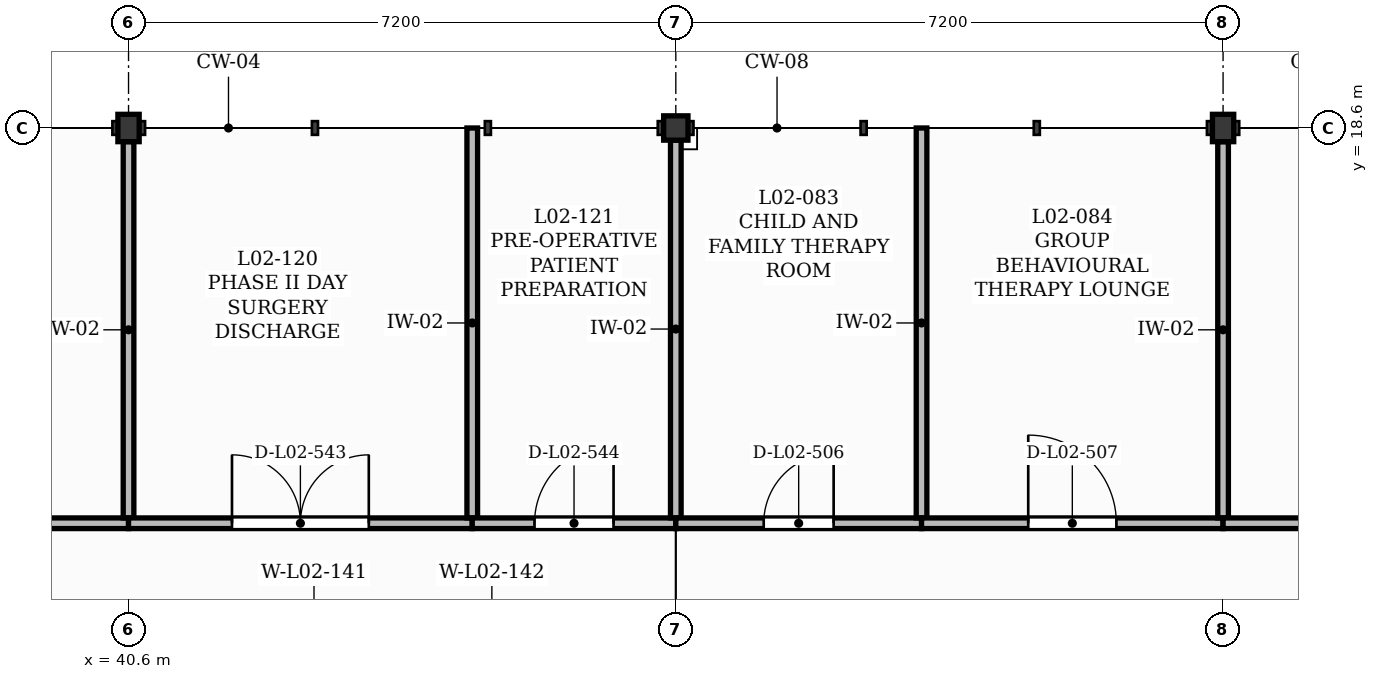
"""IFC4 building model, lengths in metres.
Left out: names, types, materials, properties, quantities, classifications, styles, units other than length and angle.
Written with IfcOpenShell. Run it as: python <this file> out.ifc"""

import sys

from ifc_helpers import new_model, si_unit, direction, frame, frame_2d, origin, origin_2d, place, context, subcontext, project, spatial, rectangle, extrude, element, fill, save


model = new_model("IFC4")
c1 = context("Model", 3, precision=1e-05, world=origin(), true_north=direction((0.0, 1.0)))
c2 = subcontext(c1, "Body", "Model", "MODEL_VIEW")
j1 = project(units=[si_unit("LENGTHUNIT", "METRE"), si_unit("PLANEANGLEUNIT", "RADIAN")], contexts=[c1])
p1 = place(None, origin())
s1 = spatial("IfcSite", under=j1, at=p1, CompositionType="ELEMENT")
p2 = place(p1, origin())
s2 = spatial("IfcBuilding", under=s1, at=p2, CompositionType="ELEMENT")
p3 = place(p2, frame((0.0, 0.0, 9.0)))
s3 = spatial("IfcBuildingStorey", under=s2, at=p3, CompositionType="ELEMENT", Elevation=9.0)
p4 = place(p3, frame((40.6, 18.6, 0.0), z_axis=(0.0, 0.0, 1.0), x_axis=(1.0, 0.0, 0.0)))
e1 = element("IfcColumn", 1, at=p4, inside=s3, PredefinedType="COLUMN", context=c2, shape_type="SweptSolid", body=[
    extrude(rectangle(XDim=0.28, YDim=0.36, at=origin_2d()), origin(), (0.0, 0.0, 1.0), 3.95),
])
p5 = place(p3, frame((47.8, 18.6, 0.0), z_axis=(0.0, 0.0, 1.0), x_axis=(1.0, 0.0, 0.0)))
e2 = element("IfcColumn", 2, at=p5, inside=s3, PredefinedType="COLUMN", context=c2, shape_type="SweptSolid", body=[
    extrude(rectangle(XDim=0.32, YDim=0.32, at=origin_2d()), origin(), (0.0, 0.0, 1.0), 3.98),
])
p6 = place(p3, frame((55.0, 18.6, 0.0), z_axis=(0.0, 0.0, 1.0), x_axis=(1.0, 0.0, 0.0)))
e3 = element("IfcColumn", 3, at=p6, inside=s3, PredefinedType="COLUMN", context=c2, shape_type="SweptSolid", body=[
    extrude(rectangle(XDim=0.28, YDim=0.36, at=origin_2d()), origin(), (0.0, 0.0, 1.0), 3.99),
])
p7 = place(p3, frame((33.4, 13.4, 0.0), z_axis=(0.0, 0.0, 1.0), x_axis=(1.0, 0.0, 0.0)))
e4 = element("IfcWall", 4, at=p7, inside=s3, PredefinedType="PARTITIONING", context=c2, shape_type="SweptSolid", body=[
    extrude(rectangle(XDim=7.2, YDim=0.14, at=frame_2d((3.6, 0.0))), origin(), (0.0, 0.0, 1.0), 3.91),
])
p8 = place(p7, frame((3.02, 0.0, 0.0)))
e5 = element("IfcOpeningElement", 5, at=p8, cuts=e4, PredefinedType="OPENING", context=c2, shape_type="SweptSolid", body=[
    extrude(rectangle(XDim=1.16, YDim=2.1, at=frame_2d((0.58, 1.05))), frame((0.0, 0.08, 0.0), z_axis=(0.0, -1.0, 0.0), x_axis=(1.0, 0.0, 0.0)), (0.0, 0.0, 1.0), 0.16),
])
p9 = place(p7, frame((4.58, 0.0, 1.05)))
e6 = element("IfcOpeningElement", 6, at=p9, cuts=e4, PredefinedType="OPENING", context=c2, shape_type="SweptSolid", body=[
    extrude(rectangle(XDim=1.4, YDim=1.1, at=frame_2d((0.7, 0.55))), frame((0.0, 0.08, 0.0), z_axis=(0.0, -1.0, 0.0), x_axis=(1.0, 0.0, 0.0)), (0.0, 0.0, 1.0), 0.16),
])
p10 = place(p3, frame((40.6, 13.47, 0.0), z_axis=(0.0, 0.0, 1.0), x_axis=(0.0, 1.0, 0.0)))
e7 = element("IfcWall", 7, at=p10, inside=s3, PredefinedType="PARTITIONING", context=c2, shape_type="SweptSolid", body=[
    extrude(rectangle(XDim=4.95, YDim=0.14, at=frame_2d((2.475, 0.0))), origin(), (0.0, 0.0, 1.0), 3.49),
])
p11 = place(p3, frame((40.6, 13.4, 0.0), z_axis=(0.0, 0.0, 1.0), x_axis=(1.0, 0.0, 0.0)))
e8 = element("IfcWall", 8, at=p11, inside=s3, PredefinedType="PARTITIONING", context=c2, shape_type="SweptSolid", body=[
    extrude(rectangle(XDim=4.522, YDim=0.14, at=frame_2d((2.261, 0.0))), origin(), (0.0, 0.0, 1.0), 3.91),
])
p12 = place(p11, frame((1.361, 0.0, 0.0)))
e9 = element("IfcOpeningElement", 9, at=p12, cuts=e8, PredefinedType="OPENING", context=c2, shape_type="SweptSolid", body=[
    extrude(rectangle(XDim=1.8, YDim=2.3, at=frame_2d((0.9, 1.15))), frame((0.0, 0.08, 0.0), z_axis=(0.0, -1.0, 0.0), x_axis=(1.0, 0.0, 0.0)), (0.0, 0.0, 1.0), 0.16),
])
p13 = place(p3, frame((45.122, 13.47, 0.0), z_axis=(0.0, 0.0, 1.0), x_axis=(0.0, 1.0, 0.0)))
e10 = element("IfcWall", 10, at=p13, inside=s3, PredefinedType="PARTITIONING", context=c2, shape_type="SweptSolid", body=[
    extrude(rectangle(XDim=5.13, YDim=0.14, at=frame_2d((2.565, 0.0))), origin(), (0.0, 0.0, 1.0), 3.91),
])
p14 = place(p3, frame((45.122, 13.4, 0.0), z_axis=(0.0, 0.0, 1.0), x_axis=(1.0, 0.0, 0.0)))
e11 = element("IfcWall", 11, at=p14, inside=s3, PredefinedType="PARTITIONING", context=c2, shape_type="SweptSolid", body=[
    extrude(rectangle(XDim=2.678, YDim=0.14, at=frame_2d((1.339, 0.0))), origin(), (0.0, 0.0, 1.0), 3.91),
])
p15 = place(p14, frame((0.819, 0.0, 0.0)))
e12 = element("IfcOpeningElement", 12, at=p15, cuts=e11, PredefinedType="OPENING", context=c2, shape_type="SweptSolid", body=[
    extrude(rectangle(XDim=1.04, YDim=2.1, at=frame_2d((0.52, 1.05))), frame((0.0, 0.08, 0.0), z_axis=(0.0, -1.0, 0.0), x_axis=(1.0, 0.0, 0.0)), (0.0, 0.0, 1.0), 0.16),
])
p16 = place(p3, frame((47.8, 13.47, 0.0), z_axis=(0.0, 0.0, 1.0), x_axis=(0.0, 1.0, 0.0)))
e13 = element("IfcWall", 13, at=p16, inside=s3, PredefinedType="PARTITIONING", context=c2, shape_type="SweptSolid", body=[
    extrude(rectangle(XDim=4.97, YDim=0.14, at=frame_2d((2.485, 0.0))), origin(), (0.0, 0.0, 1.0), 3.52),
])
p17 = place(p3, frame((47.8, 13.4, 0.0), z_axis=(0.0, 0.0, 1.0), x_axis=(1.0, 0.0, 0.0)))
e14 = element("IfcWall", 14, at=p17, inside=s3, PredefinedType="PARTITIONING", context=c2, shape_type="SweptSolid", body=[
    extrude(rectangle(XDim=3.233, YDim=0.14, at=frame_2d((1.616, 0.0))), origin(), (0.0, 0.0, 1.0), 3.96),
])
p18 = place(p17, frame((1.156, 0.0, 0.0)))
e15 = element("IfcOpeningElement", 15, at=p18, cuts=e14, PredefinedType="OPENING", context=c2, shape_type="SweptSolid", body=[
    extrude(rectangle(XDim=0.92, YDim=2.1, at=frame_2d((0.46, 1.05))), frame((0.0, 0.08, 0.0), z_axis=(0.0, -1.0, 0.0), x_axis=(1.0, 0.0, 0.0)), (0.0, 0.0, 1.0), 0.16),
])
p19 = place(p3, frame((51.033, 13.47, 0.0), z_axis=(0.0, 0.0, 1.0), x_axis=(0.0, 1.0, 0.0)))
e16 = element("IfcWall", 16, at=p19, inside=s3, PredefinedType="PARTITIONING", context=c2, shape_type="SweptSolid", body=[
    extrude(rectangle(XDim=5.13, YDim=0.14, at=frame_2d((2.565, 0.0))), origin(), (0.0, 0.0, 1.0), 3.96),
])
p20 = place(p3, frame((51.033, 13.4, 0.0), z_axis=(0.0, 0.0, 1.0), x_axis=(1.0, 0.0, 0.0)))
e17 = element("IfcWall", 17, at=p20, inside=s3, PredefinedType="PARTITIONING", context=c2, shape_type="SweptSolid", body=[
    extrude(rectangle(XDim=3.967, YDim=0.14, at=frame_2d((1.983, 0.0))), origin(), (0.0, 0.0, 1.0), 3.96),
])
p21 = place(p20, frame((1.404, 0.0, 0.0)))
e18 = element("IfcOpeningElement", 18, at=p21, cuts=e17, PredefinedType="OPENING", context=c2, shape_type="SweptSolid", body=[
    extrude(rectangle(XDim=1.16, YDim=2.1, at=frame_2d((0.58, 1.05))), frame((0.0, 0.08, 0.0), z_axis=(0.0, -1.0, 0.0), x_axis=(1.0, 0.0, 0.0)), (0.0, 0.0, 1.0), 0.16),
])
p22 = place(p3, frame((55.0, 13.47, 0.0), z_axis=(0.0, 0.0, 1.0), x_axis=(0.0, 1.0, 0.0)))
e19 = element("IfcWall", 19, at=p22, inside=s3, PredefinedType="PARTITIONING", context=c2, shape_type="SweptSolid", body=[
    extrude(rectangle(XDim=4.95, YDim=0.14, at=frame_2d((2.475, 0.0))), origin(), (0.0, 0.0, 1.0), 3.47),
])
p23 = place(p3, frame((55.0, 13.4, 0.0), z_axis=(0.0, 0.0, 1.0), x_axis=(1.0, 0.0, 0.0)))
e20 = element("IfcWall", 20, at=p23, inside=s3, PredefinedType="PARTITIONING", context=c2, shape_type="SweptSolid", body=[
    extrude(rectangle(XDim=7.2, YDim=0.14, at=frame_2d((3.6, 0.0))), origin(), (0.0, 0.0, 1.0), 3.96),
])
p24 = place(p23, frame((2.7, 0.0, 0.0)))
e21 = element("IfcOpeningElement", 21, at=p24, cuts=e20, PredefinedType="OPENING", context=c2, shape_type="SweptSolid", body=[
    extrude(rectangle(XDim=1.8, YDim=2.3, at=frame_2d((0.9, 1.15))), frame((0.0, 0.08, 0.0), z_axis=(0.0, -1.0, 0.0), x_axis=(1.0, 0.0, 0.0)), (0.0, 0.0, 1.0), 0.16),
])
p25 = place(p18, origin())
e22 = element("IfcDoor", 22, at=p25, inside=s3, OperationType="SINGLE_SWING_RIGHT", PredefinedType="DOOR", context=c2, shape_type="SweptSolid", body=[
    extrude(rectangle(XDim=0.92, YDim=2.1, at=frame_2d((0.46, 1.05))), frame((0.0, 0.025, 0.0), z_axis=(0.0, -1.0, 0.0), x_axis=(1.0, 0.0, 0.0)), (0.0, 0.0, 1.0), 0.05),
])
fill(e15, e22)
p26 = place(p21, origin())
e23 = element("IfcDoor", 23, at=p26, inside=s3, OperationType="SINGLE_SWING_LEFT", PredefinedType="DOOR", context=c2, shape_type="SweptSolid", body=[
    extrude(rectangle(XDim=1.16, YDim=2.1, at=frame_2d((0.58, 1.05))), frame((0.0, 0.025, 0.0), z_axis=(0.0, -1.0, 0.0), x_axis=(1.0, 0.0, 0.0)), (0.0, 0.0, 1.0), 0.05),
])
fill(e18, e23)
p27 = place(p12, origin())
e24 = element("IfcDoor", 24, at=p27, inside=s3, OperationType="DOUBLE_DOOR_SINGLE_SWING", PredefinedType="DOOR", context=c2, shape_type="SweptSolid", body=[
    extrude(rectangle(XDim=1.8, YDim=2.3, at=frame_2d((0.9, 1.15))), frame((0.0, 0.025, 0.0), z_axis=(0.0, -1.0, 0.0), x_axis=(1.0, 0.0, 0.0)), (0.0, 0.0, 1.0), 0.05),
])
fill(e9, e24)
p28 = place(p15, origin())
e25 = element("IfcDoor", 25, at=p28, inside=s3, OperationType="SINGLE_SWING_RIGHT", PredefinedType="DOOR", context=c2, shape_type="SweptSolid", body=[
    extrude(rectangle(XDim=1.04, YDim=2.1, at=frame_2d((0.52, 1.05))), frame((0.0, 0.025, 0.0), z_axis=(0.0, -1.0, 0.0), x_axis=(1.0, 0.0, 0.0)), (0.0, 0.0, 1.0), 0.05),
])
fill(e12, e25)
save(model, sys.argv[1])
